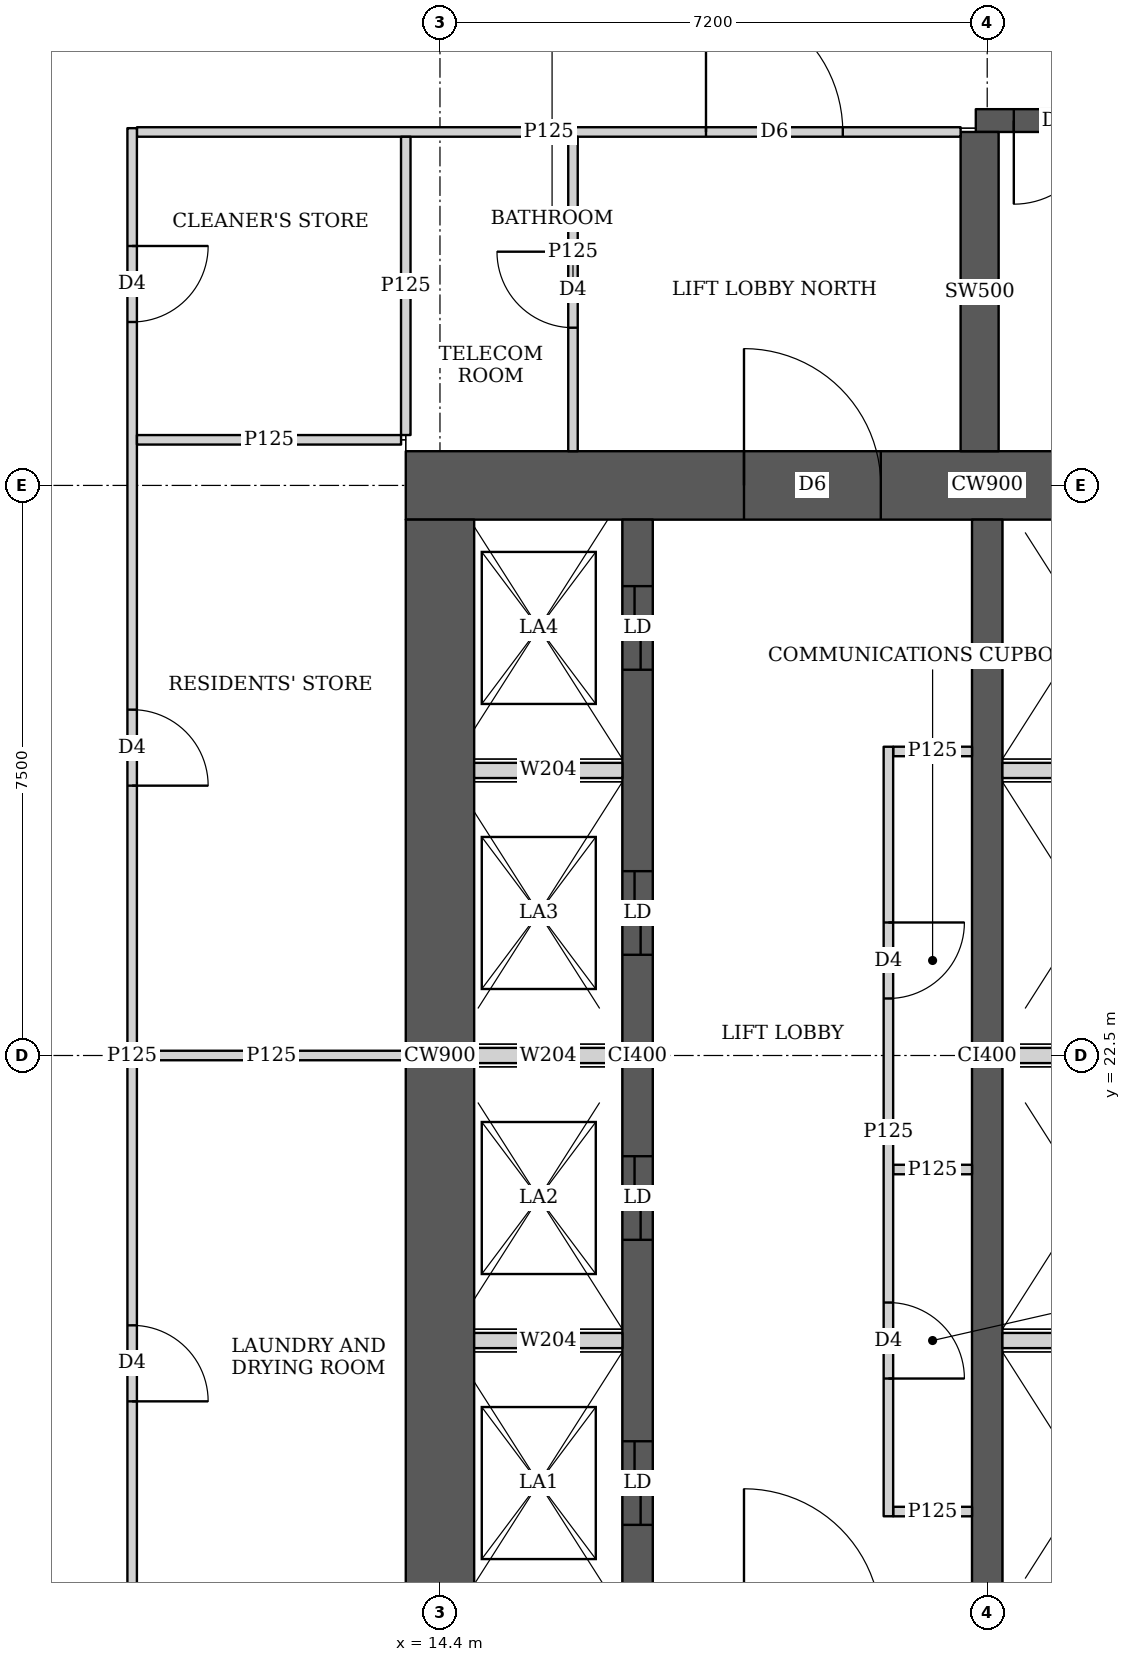
"""IFC4 building model, lengths in metres.
Left out: names, types, materials, properties, quantities, classifications, styles, units other than length and angle.
Written with IfcOpenShell. Run it as: python <this file> out.ifc"""

import sys

from ifc_helpers import new_model, si_unit, direction, frame, frame_2d, origin, place, context, subcontext, project, spatial, rectangle, extrude, element, fill, save


model = new_model("IFC4")
c1 = context("Model", 3, precision=1e-05, world=origin(), true_north=direction((0.0, 1.0)))
c2 = subcontext(c1, "Body", "Model", "MODEL_VIEW")
j1 = project(units=[si_unit("LENGTHUNIT", "METRE"), si_unit("PLANEANGLEUNIT", "RADIAN")], contexts=[c1])
p1 = place(None, origin())
s1 = spatial("IfcSite", under=j1, at=p1, CompositionType="ELEMENT")
p2 = place(p1, origin())
s2 = spatial("IfcBuilding", under=s1, at=p2, CompositionType="ELEMENT")
p3 = place(p2, frame((0.0, 0.0, 65.0)))
s3 = spatial("IfcBuildingStorey", under=s2, at=p3, CompositionType="ELEMENT", Elevation=65.0)
p4 = place(p3, frame((13.95, 30.0, 0.0), z_axis=(0.0, 0.0, 1.0), x_axis=(1.0, 0.0, 0.0)))
e1 = element("IfcWall", 1, at=p4, inside=s3, PredefinedType="SHEAR", context=c2, shape_type="SweptSolid", body=[
    extrude(rectangle(XDim=15.3, YDim=0.9, at=frame_2d((7.65, 0.0))), origin(), (0.0, 0.0, 1.0), 3.75),
])
p5 = place(p4, frame((4.45, 0.0, 0.0)))
e2 = element("IfcOpeningElement", 2, at=p5, cuts=e1, PredefinedType="OPENING", context=c2, shape_type="SweptSolid", body=[
    extrude(rectangle(XDim=1.8, YDim=2.1, at=frame_2d((0.9, 1.05))), frame((0.0, 0.46, 0.0), z_axis=(0.0, -1.0, 0.0), x_axis=(1.0, 0.0, 0.0)), (0.0, 0.0, 1.0), 0.92),
])
p6 = place(p4, frame((10.7, 0.0, 0.0)))
e3 = element("IfcOpeningElement", 3, at=p6, cuts=e1, PredefinedType="OPENING", context=c2, shape_type="SweptSolid", body=[
    extrude(rectangle(XDim=1.1, YDim=2.1, at=frame_2d((0.55, 1.05))), frame((0.0, 0.46, 0.0), z_axis=(0.0, -1.0, 0.0), x_axis=(1.0, 0.0, 0.0)), (0.0, 0.0, 1.0), 0.92),
])
p7 = place(p3, frame((14.4, 15.45, 0.0), z_axis=(0.0, 0.0, 1.0), x_axis=(0.0, 1.0, 0.0)))
e4 = element("IfcWall", 4, at=p7, inside=s3, PredefinedType="SHEAR", context=c2, shape_type="SweptSolid", body=[
    extrude(rectangle(XDim=14.1, YDim=0.9, at=frame_2d((7.05, 0.0))), origin(), (0.0, 0.0, 1.0), 3.75),
])
p8 = place(p3, frame((17.0, 15.45, 0.0), z_axis=(0.0, 0.0, 1.0), x_axis=(0.0, 1.0, 0.0)))
e5 = element("IfcWall", 5, at=p8, inside=s3, PredefinedType="SHEAR", context=c2, shape_type="SweptSolid", body=[
    extrude(rectangle(XDim=14.1, YDim=0.4, at=frame_2d((7.05, 0.0))), origin(), (0.0, 0.0, 1.0), 3.75),
])
p9 = place(p8, frame((0.875, 0.0, 0.0)))
e6 = element("IfcOpeningElement", 6, at=p9, cuts=e5, PredefinedType="OPENING", context=c2, shape_type="SweptSolid", body=[
    extrude(rectangle(XDim=1.1, YDim=2.1, at=frame_2d((0.55, 1.05))), frame((0.0, 0.21, 0.0), z_axis=(0.0, -1.0, 0.0), x_axis=(1.0, 0.0, 0.0)), (0.0, 0.0, 1.0), 0.42),
])
p10 = place(p8, frame((4.625, 0.0, 0.0)))
e7 = element("IfcOpeningElement", 7, at=p10, cuts=e5, PredefinedType="OPENING", context=c2, shape_type="SweptSolid", body=[
    extrude(rectangle(XDim=1.1, YDim=2.1, at=frame_2d((0.55, 1.05))), frame((0.0, 0.21, 0.0), z_axis=(0.0, -1.0, 0.0), x_axis=(1.0, 0.0, 0.0)), (0.0, 0.0, 1.0), 0.42),
])
p11 = place(p8, frame((8.375, 0.0, 0.0)))
e8 = element("IfcOpeningElement", 8, at=p11, cuts=e5, PredefinedType="OPENING", context=c2, shape_type="SweptSolid", body=[
    extrude(rectangle(XDim=1.1, YDim=2.1, at=frame_2d((0.55, 1.05))), frame((0.0, 0.21, 0.0), z_axis=(0.0, -1.0, 0.0), x_axis=(1.0, 0.0, 0.0)), (0.0, 0.0, 1.0), 0.42),
])
p12 = place(p8, frame((12.125, 0.0, 0.0)))
e9 = element("IfcOpeningElement", 9, at=p12, cuts=e5, PredefinedType="OPENING", context=c2, shape_type="SweptSolid", body=[
    extrude(rectangle(XDim=1.1, YDim=2.1, at=frame_2d((0.55, 1.05))), frame((0.0, 0.21, 0.0), z_axis=(0.0, -1.0, 0.0), x_axis=(1.0, 0.0, 0.0)), (0.0, 0.0, 1.0), 0.42),
])
p13 = place(p3, frame((21.6, 15.45, 0.0), z_axis=(0.0, 0.0, 1.0), x_axis=(0.0, 1.0, 0.0)))
e10 = element("IfcWall", 10, at=p13, inside=s3, PredefinedType="SHEAR", context=c2, shape_type="SweptSolid", body=[
    extrude(rectangle(XDim=14.1, YDim=0.4, at=frame_2d((7.05, 0.0))), origin(), (0.0, 0.0, 1.0), 3.75),
])
p14 = place(p3, frame((21.45, 34.8, 0.0), z_axis=(0.0, 0.0, 1.0), x_axis=(1.0, 0.0, 0.0)))
e11 = element("IfcWall", 11, at=p14, inside=s3, PredefinedType="SHEAR", context=c2, shape_type="SweptSolid", body=[
    extrude(rectangle(XDim=7.5, YDim=0.3, at=frame_2d((3.75, 0.0))), origin(), (0.0, 0.0, 1.0), 3.75),
])
p15 = place(p14, frame((0.5, 0.0, 0.0)))
e12 = element("IfcOpeningElement", 12, at=p15, cuts=e11, PredefinedType="OPENING", context=c2, shape_type="SweptSolid", body=[
    extrude(rectangle(XDim=1.1, YDim=2.1, at=frame_2d((0.55, 1.05))), frame((0.0, 0.16, 0.0), z_axis=(0.0, -1.0, 0.0), x_axis=(1.0, 0.0, 0.0)), (0.0, 0.0, 1.0), 0.32),
])
p16 = place(p3, frame((21.5, 30.45, 0.0), z_axis=(0.0, 0.0, 1.0), x_axis=(0.0, 1.0, 0.0)))
e13 = element("IfcWall", 13, at=p16, inside=s3, PredefinedType="SHEAR", context=c2, shape_type="SweptSolid", body=[
    extrude(rectangle(XDim=4.2, YDim=0.5, at=frame_2d((2.1, 0.0))), origin(), (0.0, 0.0, 1.0), 3.75),
])
p17 = place(p3, frame((10.35, 10.3, 0.0), z_axis=(0.0, 0.0, 1.0), x_axis=(0.0, 1.0, 0.0)))
e14 = element("IfcWall", 14, at=p17, inside=s3, PredefinedType="PARTITIONING", context=c2, shape_type="SweptSolid", body=[
    extrude(rectangle(XDim=24.4, YDim=0.125, at=frame_2d((12.2, 0.0))), origin(), (0.0, 0.0, 1.0), 3.5),
])
p18 = place(p17, frame((1.55, 0.0, 0.0)))
e15 = element("IfcOpeningElement", 15, at=p18, cuts=e14, PredefinedType="OPENING", context=c2, shape_type="SweptSolid", body=[
    extrude(rectangle(XDim=1.0, YDim=2.1, at=frame_2d((0.5, 1.05))), frame((0.0, 0.073, 0.0), z_axis=(0.0, -1.0, 0.0), x_axis=(1.0, 0.0, 0.0)), (0.0, 0.0, 1.0), 0.145),
])
p19 = place(p17, frame((7.65, 0.0, 0.0)))
e16 = element("IfcOpeningElement", 16, at=p19, cuts=e14, PredefinedType="OPENING", context=c2, shape_type="SweptSolid", body=[
    extrude(rectangle(XDim=1.0, YDim=2.1, at=frame_2d((0.5, 1.05))), frame((0.0, 0.073, 0.0), z_axis=(0.0, -1.0, 0.0), x_axis=(1.0, 0.0, 0.0)), (0.0, 0.0, 1.0), 0.145),
])
p20 = place(p17, frame((15.75, 0.0, 0.0)))
e17 = element("IfcOpeningElement", 17, at=p20, cuts=e14, PredefinedType="OPENING", context=c2, shape_type="SweptSolid", body=[
    extrude(rectangle(XDim=1.0, YDim=2.1, at=frame_2d((0.5, 1.05))), frame((0.0, 0.073, 0.0), z_axis=(0.0, -1.0, 0.0), x_axis=(1.0, 0.0, 0.0)), (0.0, 0.0, 1.0), 0.145),
])
p21 = place(p17, frame((21.85, 0.0, 0.0)))
e18 = element("IfcOpeningElement", 18, at=p21, cuts=e14, PredefinedType="OPENING", context=c2, shape_type="SweptSolid", body=[
    extrude(rectangle(XDim=1.0, YDim=2.1, at=frame_2d((0.5, 1.05))), frame((0.0, 0.073, 0.0), z_axis=(0.0, -1.0, 0.0), x_axis=(1.0, 0.0, 0.0)), (0.0, 0.0, 1.0), 0.145),
])
p22 = place(p3, frame((10.413, 22.5, 0.0), z_axis=(0.0, 0.0, 1.0), x_axis=(1.0, 0.0, 0.0)))
e19 = element("IfcWall", 19, at=p22, inside=s3, PredefinedType="PARTITIONING", context=c2, shape_type="SweptSolid", body=[
    extrude(rectangle(XDim=3.537, YDim=0.125, at=frame_2d((1.769, 0.0))), origin(), (0.0, 0.0, 1.0), 3.5),
])
p23 = place(p3, frame((10.413, 30.6, 0.0), z_axis=(0.0, 0.0, 1.0), x_axis=(1.0, 0.0, 0.0)))
e20 = element("IfcWall", 20, at=p23, inside=s3, PredefinedType="PARTITIONING", context=c2, shape_type="SweptSolid", body=[
    extrude(rectangle(XDim=3.475, YDim=0.125, at=frame_2d((1.737, 0.0))), origin(), (0.0, 0.0, 1.0), 3.5),
])
p24 = place(p3, frame((13.95, 30.663, 0.0), z_axis=(0.0, 0.0, 1.0), x_axis=(0.0, 1.0, 0.0)))
e21 = element("IfcWall", 21, at=p24, inside=s3, PredefinedType="PARTITIONING", context=c2, shape_type="SweptSolid", body=[
    extrude(rectangle(XDim=3.924, YDim=0.125, at=frame_2d((1.962, 0.0))), origin(), (0.0, 0.0, 1.0), 3.5),
])
p25 = place(p3, frame((10.413, 34.65, 0.0), z_axis=(0.0, 0.0, 1.0), x_axis=(1.0, 0.0, 0.0)))
e22 = element("IfcWall", 22, at=p25, inside=s3, PredefinedType="PARTITIONING", context=c2, shape_type="SweptSolid", body=[
    extrude(rectangle(XDim=10.837, YDim=0.125, at=frame_2d((5.418, 0.0))), origin(), (0.0, 0.0, 1.0), 3.5),
])
p26 = place(p25, frame((7.487, 0.0, 0.0)))
e23 = element("IfcOpeningElement", 23, at=p26, cuts=e22, PredefinedType="OPENING", context=c2, shape_type="SweptSolid", body=[
    extrude(rectangle(XDim=1.8, YDim=2.1, at=frame_2d((0.9, 1.05))), frame((0.0, 0.073, 0.0), z_axis=(0.0, -1.0, 0.0), x_axis=(1.0, 0.0, 0.0)), (0.0, 0.0, 1.0), 0.145),
])
p27 = place(p3, frame((16.15, 30.45, 0.0), z_axis=(0.0, 0.0, 1.0), x_axis=(0.0, 1.0, 0.0)))
e24 = element("IfcWall", 24, at=p27, inside=s3, PredefinedType="PARTITIONING", context=c2, shape_type="SweptSolid", body=[
    extrude(rectangle(XDim=4.137, YDim=0.125, at=frame_2d((2.068, 0.0))), origin(), (0.0, 0.0, 1.0), 3.5),
])
p28 = place(p27, frame((1.625, 0.0, 0.0)))
e25 = element("IfcOpeningElement", 25, at=p28, cuts=e24, PredefinedType="OPENING", context=c2, shape_type="SweptSolid", body=[
    extrude(rectangle(XDim=1.0, YDim=2.1, at=frame_2d((0.5, 1.05))), frame((0.0, 0.073, 0.0), z_axis=(0.0, -1.0, 0.0), x_axis=(1.0, 0.0, 0.0)), (0.0, 0.0, 1.0), 0.145),
])
p29 = place(p3, frame((20.3, 16.438, 0.0), z_axis=(0.0, 0.0, 1.0), x_axis=(0.0, 1.0, 0.0)))
e26 = element("IfcWall", 26, at=p29, inside=s3, PredefinedType="PARTITIONING", context=c2, shape_type="SweptSolid", body=[
    extrude(rectangle(XDim=10.124, YDim=0.125, at=frame_2d((5.062, 0.0))), origin(), (0.0, 0.0, 1.0), 3.5),
])
p30 = place(p29, frame((1.812, 0.0, 0.0)))
e27 = element("IfcOpeningElement", 27, at=p30, cuts=e26, PredefinedType="OPENING", context=c2, shape_type="SweptSolid", body=[
    extrude(rectangle(XDim=1.0, YDim=2.1, at=frame_2d((0.5, 1.05))), frame((0.0, 0.073, 0.0), z_axis=(0.0, -1.0, 0.0), x_axis=(1.0, 0.0, 0.0)), (0.0, 0.0, 1.0), 0.145),
])
p31 = place(p29, frame((6.812, 0.0, 0.0)))
e28 = element("IfcOpeningElement", 28, at=p31, cuts=e26, PredefinedType="OPENING", context=c2, shape_type="SweptSolid", body=[
    extrude(rectangle(XDim=1.0, YDim=2.1, at=frame_2d((0.5, 1.05))), frame((0.0, 0.073, 0.0), z_axis=(0.0, -1.0, 0.0), x_axis=(1.0, 0.0, 0.0)), (0.0, 0.0, 1.0), 0.145),
])
for number, where, z_axis, x_axis in (
    (29, (20.363, 16.5, 0.0), (0.0, 0.0, 1.0), (1.0, 0.0, 0.0)),
    (30, (20.363, 26.5, 0.0), (0.0, 0.0, 1.0), (1.0, 0.0, 0.0)),
    (31, (20.363, 21.0, 0.0), (0.0, 0.0, 1.0), (1.0, 0.0, 0.0)),
):
    element("IfcWall", number, at=place(p3, frame(where, z_axis=z_axis, x_axis=x_axis)), inside=s3, PredefinedType="PARTITIONING", context=c2, shape_type="SweptSolid", body=[
        extrude(rectangle(XDim=1.037, YDim=0.125, at=frame_2d((0.519, 0.0))), origin(), (0.0, 0.0, 1.0), 3.5),
    ])
p32 = place(p3, frame((14.85, 18.75, 0.0), z_axis=(0.0, 0.0, 1.0), x_axis=(1.0, 0.0, 0.0)))
e32 = element("IfcWall", 32, at=p32, inside=s3, PredefinedType="SOLIDWALL", context=c2, shape_type="SweptSolid", body=[
    extrude(rectangle(XDim=1.95, YDim=0.2, at=frame_2d((0.975, 0.0))), origin(), (0.0, 0.0, 1.0), 3.5),
])
p33 = place(p3, frame((21.8, 18.75, 0.0), z_axis=(0.0, 0.0, 1.0), x_axis=(1.0, 0.0, 0.0)))
e33 = element("IfcWall", 33, at=p33, inside=s3, PredefinedType="SOLIDWALL", context=c2, shape_type="SweptSolid", body=[
    extrude(rectangle(XDim=2.2, YDim=0.2, at=frame_2d((1.1, 0.0))), origin(), (0.0, 0.0, 1.0), 3.5),
])
p34 = place(p3, frame((14.85, 22.5, 0.0), z_axis=(0.0, 0.0, 1.0), x_axis=(1.0, 0.0, 0.0)))
e34 = element("IfcWall", 34, at=p34, inside=s3, PredefinedType="SOLIDWALL", context=c2, shape_type="SweptSolid", body=[
    extrude(rectangle(XDim=1.95, YDim=0.2, at=frame_2d((0.975, 0.0))), origin(), (0.0, 0.0, 1.0), 3.5),
])
p35 = place(p3, frame((21.8, 22.5, 0.0), z_axis=(0.0, 0.0, 1.0), x_axis=(1.0, 0.0, 0.0)))
e35 = element("IfcWall", 35, at=p35, inside=s3, PredefinedType="SOLIDWALL", context=c2, shape_type="SweptSolid", body=[
    extrude(rectangle(XDim=2.2, YDim=0.2, at=frame_2d((1.1, 0.0))), origin(), (0.0, 0.0, 1.0), 3.5),
])
p36 = place(p3, frame((14.85, 26.25, 0.0), z_axis=(0.0, 0.0, 1.0), x_axis=(1.0, 0.0, 0.0)))
e36 = element("IfcWall", 36, at=p36, inside=s3, PredefinedType="SOLIDWALL", context=c2, shape_type="SweptSolid", body=[
    extrude(rectangle(XDim=1.95, YDim=0.2, at=frame_2d((0.975, 0.0))), origin(), (0.0, 0.0, 1.0), 3.5),
])
p37 = place(p3, frame((21.8, 26.25, 0.0), z_axis=(0.0, 0.0, 1.0), x_axis=(1.0, 0.0, 0.0)))
e37 = element("IfcWall", 37, at=p37, inside=s3, PredefinedType="SOLIDWALL", context=c2, shape_type="SweptSolid", body=[
    extrude(rectangle(XDim=2.2, YDim=0.2, at=frame_2d((1.1, 0.0))), origin(), (0.0, 0.0, 1.0), 3.5),
])
p38 = place(p19, origin())
e38 = element("IfcDoor", 38, at=p38, inside=s3, OperationType="SINGLE_SWING_RIGHT", PredefinedType="DOOR", context=c2, shape_type="SweptSolid", body=[
    extrude(rectangle(XDim=1.0, YDim=2.1, at=frame_2d((0.5, 1.05))), frame((0.0, 0.025, 0.0), z_axis=(0.0, -1.0, 0.0), x_axis=(1.0, 0.0, 0.0)), (0.0, 0.0, 1.0), 0.05),
])
fill(e16, e38)
p39 = place(p20, origin())
e39 = element("IfcDoor", 39, at=p39, inside=s3, OperationType="SINGLE_SWING_RIGHT", PredefinedType="DOOR", context=c2, shape_type="SweptSolid", body=[
    extrude(rectangle(XDim=1.0, YDim=2.1, at=frame_2d((0.5, 1.05))), frame((0.0, 0.025, 0.0), z_axis=(0.0, -1.0, 0.0), x_axis=(1.0, 0.0, 0.0)), (0.0, 0.0, 1.0), 0.05),
])
fill(e17, e39)
p40 = place(p21, origin())
e40 = element("IfcDoor", 40, at=p40, inside=s3, OperationType="SINGLE_SWING_LEFT", PredefinedType="DOOR", context=c2, shape_type="SweptSolid", body=[
    extrude(rectangle(XDim=1.0, YDim=2.1, at=frame_2d((0.5, 1.05))), frame((0.0, 0.025, 0.0), z_axis=(0.0, -1.0, 0.0), x_axis=(1.0, 0.0, 0.0)), (0.0, 0.0, 1.0), 0.05),
])
fill(e18, e40)
p41 = place(p28, origin())
e41 = element("IfcDoor", 41, at=p41, inside=s3, OperationType="SINGLE_SWING_RIGHT", PredefinedType="DOOR", context=c2, shape_type="SweptSolid", body=[
    extrude(rectangle(XDim=1.0, YDim=2.1, at=frame_2d((0.5, 1.05))), frame((0.0, 0.025, 0.0), z_axis=(0.0, -1.0, 0.0), x_axis=(1.0, 0.0, 0.0)), (0.0, 0.0, 1.0), 0.05),
])
fill(e25, e41)
p42 = place(p26, origin())
e42 = element("IfcDoor", 42, at=p42, inside=s3, OperationType="DOUBLE_DOOR_SINGLE_SWING", PredefinedType="DOOR", context=c2, shape_type="SweptSolid", body=[
    extrude(rectangle(XDim=1.8, YDim=2.1, at=frame_2d((0.9, 1.05))), frame((0.0, 0.025, 0.0), z_axis=(0.0, -1.0, 0.0), x_axis=(1.0, 0.0, 0.0)), (0.0, 0.0, 1.0), 0.05),
])
fill(e23, e42)
p43 = place(p30, origin())
e43 = element("IfcDoor", 43, at=p43, inside=s3, OperationType="SINGLE_SWING_RIGHT", PredefinedType="DOOR", context=c2, shape_type="SweptSolid", body=[
    extrude(rectangle(XDim=1.0, YDim=2.1, at=frame_2d((0.5, 1.05))), frame((0.0, 0.025, 0.0), z_axis=(0.0, -1.0, 0.0), x_axis=(1.0, 0.0, 0.0)), (0.0, 0.0, 1.0), 0.05),
])
fill(e27, e43)
p44 = place(p31, origin())
e44 = element("IfcDoor", 44, at=p44, inside=s3, OperationType="SINGLE_SWING_LEFT", PredefinedType="DOOR", context=c2, shape_type="SweptSolid", body=[
    extrude(rectangle(XDim=1.0, YDim=2.1, at=frame_2d((0.5, 1.05))), frame((0.0, 0.025, 0.0), z_axis=(0.0, -1.0, 0.0), x_axis=(1.0, 0.0, 0.0)), (0.0, 0.0, 1.0), 0.05),
])
fill(e28, e44)
p45 = place(p5, origin())
e45 = element("IfcDoor", 45, at=p45, inside=s3, OperationType="DOUBLE_DOOR_SINGLE_SWING", PredefinedType="DOOR", context=c2, shape_type="SweptSolid", body=[
    extrude(rectangle(XDim=1.8, YDim=2.1, at=frame_2d((0.9, 1.05))), frame((0.0, 0.025, 0.0), z_axis=(0.0, -1.0, 0.0), x_axis=(1.0, 0.0, 0.0)), (0.0, 0.0, 1.0), 0.05),
])
fill(e2, e45)
p46 = place(p9, origin())
e46 = element("IfcDoor", 46, at=p46, inside=s3, OperationType="DOUBLE_DOOR_SLIDING", PredefinedType="DOOR", context=c2, shape_type="SweptSolid", body=[
    extrude(rectangle(XDim=1.1, YDim=2.1, at=frame_2d((0.55, 1.05))), frame((0.0, 0.025, 0.0), z_axis=(0.0, -1.0, 0.0), x_axis=(1.0, 0.0, 0.0)), (0.0, 0.0, 1.0), 0.05),
])
fill(e6, e46)
p47 = place(p10, origin())
e47 = element("IfcDoor", 47, at=p47, inside=s3, OperationType="DOUBLE_DOOR_SLIDING", PredefinedType="DOOR", context=c2, shape_type="SweptSolid", body=[
    extrude(rectangle(XDim=1.1, YDim=2.1, at=frame_2d((0.55, 1.05))), frame((0.0, 0.025, 0.0), z_axis=(0.0, -1.0, 0.0), x_axis=(1.0, 0.0, 0.0)), (0.0, 0.0, 1.0), 0.05),
])
fill(e7, e47)
p48 = place(p11, origin())
e48 = element("IfcDoor", 48, at=p48, inside=s3, OperationType="DOUBLE_DOOR_SLIDING", PredefinedType="DOOR", context=c2, shape_type="SweptSolid", body=[
    extrude(rectangle(XDim=1.1, YDim=2.1, at=frame_2d((0.55, 1.05))), frame((0.0, 0.025, 0.0), z_axis=(0.0, -1.0, 0.0), x_axis=(1.0, 0.0, 0.0)), (0.0, 0.0, 1.0), 0.05),
])
fill(e8, e48)
p49 = place(p12, origin())
e49 = element("IfcDoor", 49, at=p49, inside=s3, OperationType="DOUBLE_DOOR_SLIDING", PredefinedType="DOOR", context=c2, shape_type="SweptSolid", body=[
    extrude(rectangle(XDim=1.1, YDim=2.1, at=frame_2d((0.55, 1.05))), frame((0.0, 0.025, 0.0), z_axis=(0.0, -1.0, 0.0), x_axis=(1.0, 0.0, 0.0)), (0.0, 0.0, 1.0), 0.05),
])
fill(e9, e49)
p50 = place(p15, origin())
e50 = element("IfcDoor", 50, at=p50, inside=s3, OperationType="SINGLE_SWING_RIGHT", PredefinedType="DOOR", context=c2, shape_type="SweptSolid", body=[
    extrude(rectangle(XDim=1.1, YDim=2.1, at=frame_2d((0.55, 1.05))), frame((0.0, 0.025, 0.0), z_axis=(0.0, -1.0, 0.0), x_axis=(1.0, 0.0, 0.0)), (0.0, 0.0, 1.0), 0.05),
])
fill(e12, e50)
save(model, sys.argv[1])
